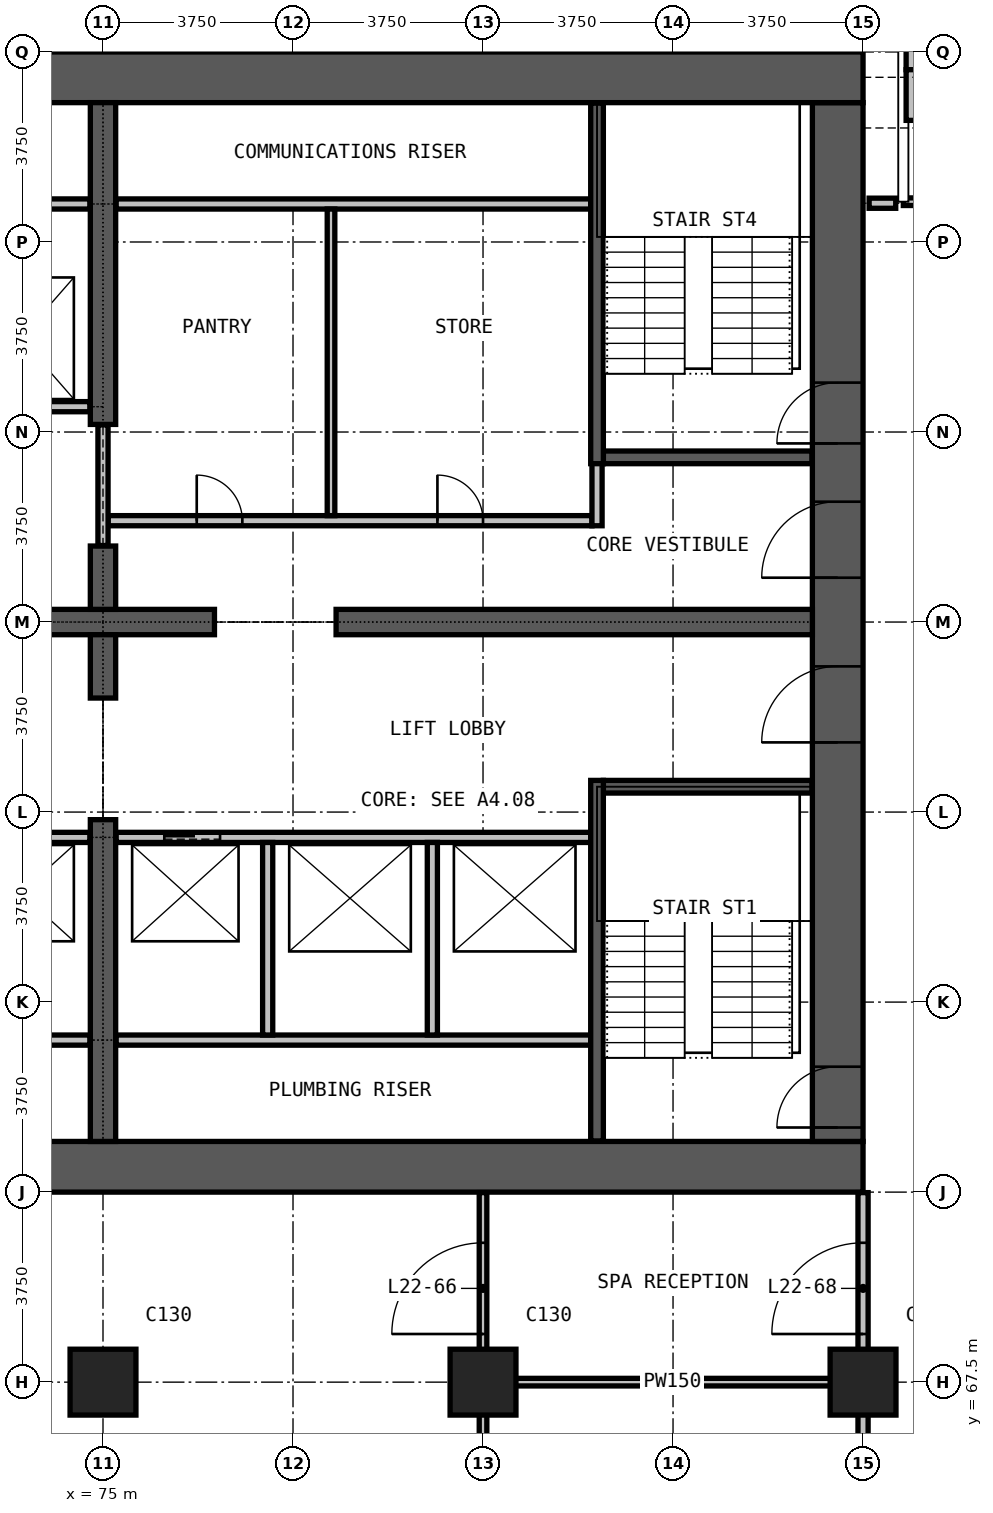
"""IFC4 building model, lengths in metres.
Left out: names, types, materials, properties, quantities, classifications, styles, units other than length and angle.
Written with IfcOpenShell. Run it as: python <this file> out.ifc"""

import sys

from ifc_helpers import new_model, si_unit, direction, frame, frame_2d, origin, origin_2d, place, context, subcontext, project, spatial, rectangle, extrude, element, fill, save


model = new_model("IFC4")
c1 = context("Model", 3, precision=1e-05, world=origin(), true_north=direction((0.0, 1.0)))
c2 = subcontext(c1, "Body", "Model", "MODEL_VIEW")
j1 = project(units=[si_unit("LENGTHUNIT", "METRE"), si_unit("PLANEANGLEUNIT", "RADIAN")], contexts=[c1])
p1 = place(None, origin())
s1 = spatial("IfcSite", under=j1, at=p1, CompositionType="ELEMENT")
p2 = place(p1, origin())
s2 = spatial("IfcBuilding", under=s1, at=p2, CompositionType="ELEMENT")
p3 = place(p2, frame((0.0, 0.0, 92.3)))
s3 = spatial("IfcBuildingStorey", under=s2, at=p3, CompositionType="ELEMENT", Elevation=92.3)
for number, where, z_axis, x_axis in (
    (1, (75.0, 67.5, 0.0), (0.0, 0.0, 1.0), (1.0, 0.0, 0.0)),
    (2, (82.5, 67.5, 0.0), (0.0, 0.0, 1.0), (1.0, 0.0, 0.0)),
    (3, (90.0, 67.5, 0.0), (0.0, 0.0, 1.0), (1.0, 0.0, 0.0)),
):
    element("IfcColumn", number, at=place(p3, frame(where, z_axis=z_axis, x_axis=x_axis)), inside=s3, PredefinedType="COLUMN", context=c2, shape_type="SweptSolid", body=[
        extrude(rectangle(XDim=1.3, YDim=1.3, at=origin_2d()), origin(), (0.0, 0.0, 1.0), 3.3),
    ])
p4 = place(p3, frame((60.0, 71.75, 0.0), z_axis=(0.0, 0.0, 1.0), x_axis=(1.0, 0.0, 0.0)))
e4 = element("IfcWall", 4, at=p4, inside=s3, PredefinedType="SHEAR", context=c2, shape_type="SweptSolid", body=[
    extrude(rectangle(XDim=30.0, YDim=1.0, at=frame_2d((15.0, 0.0))), origin(), (0.0, 0.0, 1.0), 3.3),
])
p5 = place(p3, frame((89.5, 72.25, 0.0), z_axis=(0.0, 0.0, 1.0), x_axis=(0.0, 1.0, 0.0)))
e5 = element("IfcWall", 5, at=p5, inside=s3, PredefinedType="SHEAR", context=c2, shape_type="SweptSolid", body=[
    extrude(rectangle(XDim=20.5, YDim=1.0, at=frame_2d((10.25, 0.0))), origin(), (0.0, 0.0, 1.0), 3.3),
])
p6 = place(p5, frame((0.275, 0.0, 0.0)))
e6 = element("IfcOpeningElement", 6, at=p6, cuts=e5, PredefinedType="OPENING", context=c2, shape_type="SweptSolid", body=[
    extrude(rectangle(XDim=1.2, YDim=2.2, at=frame_2d((0.6, 1.1))), frame((0.0, 0.51, 0.0), z_axis=(0.0, -1.0, 0.0), x_axis=(1.0, 0.0, 0.0)), (0.0, 0.0, 1.0), 1.02),
])
p7 = place(p5, frame((13.775, 0.0, 0.0)))
e7 = element("IfcOpeningElement", 7, at=p7, cuts=e5, PredefinedType="OPENING", context=c2, shape_type="SweptSolid", body=[
    extrude(rectangle(XDim=1.2, YDim=2.2, at=frame_2d((0.6, 1.1))), frame((0.0, 0.51, 0.0), z_axis=(0.0, -1.0, 0.0), x_axis=(1.0, 0.0, 0.0)), (0.0, 0.0, 1.0), 1.02),
])
p8 = place(p5, frame((7.875, 0.0, 0.0)))
e8 = element("IfcOpeningElement", 8, at=p8, cuts=e5, PredefinedType="OPENING", context=c2, shape_type="SweptSolid", body=[
    extrude(rectangle(XDim=1.5, YDim=2.2, at=frame_2d((0.75, 1.1))), frame((0.0, 0.51, 0.0), z_axis=(0.0, -1.0, 0.0), x_axis=(1.0, 0.0, 0.0)), (0.0, 0.0, 1.0), 1.02),
])
p9 = place(p5, frame((11.125, 0.0, 0.0)))
e9 = element("IfcOpeningElement", 9, at=p9, cuts=e5, PredefinedType="OPENING", context=c2, shape_type="SweptSolid", body=[
    extrude(rectangle(XDim=1.5, YDim=2.2, at=frame_2d((0.75, 1.1))), frame((0.0, 0.51, 0.0), z_axis=(0.0, -1.0, 0.0), x_axis=(1.0, 0.0, 0.0)), (0.0, 0.0, 1.0), 1.02),
])
p10 = place(p3, frame((90.0, 93.25, 0.0), z_axis=(0.0, 0.0, 1.0), x_axis=(-1.0, 0.0, 0.0)))
e10 = element("IfcWall", 10, at=p10, inside=s3, PredefinedType="SHEAR", context=c2, shape_type="SweptSolid", body=[
    extrude(rectangle(XDim=30.0, YDim=1.0, at=frame_2d((15.0, 0.0))), origin(), (0.0, 0.0, 1.0), 3.3),
])
p11 = place(p3, frame((72.8, 82.5, 0.0), z_axis=(0.0, 0.0, 1.0), x_axis=(1.0, 0.0, 0.0)))
e11 = element("IfcWall", 11, at=p11, inside=s3, PredefinedType="SHEAR", context=c2, shape_type="SweptSolid", body=[
    extrude(rectangle(XDim=4.4, YDim=0.5, at=frame_2d((2.2, 0.0))), origin(), (0.0, 0.0, 1.0), 3.3),
])
p12 = place(p3, frame((79.6, 82.5, 0.0), z_axis=(0.0, 0.0, 1.0), x_axis=(1.0, 0.0, 0.0)))
e12 = element("IfcWall", 12, at=p12, inside=s3, PredefinedType="SHEAR", context=c2, shape_type="SweptSolid", body=[
    extrude(rectangle(XDim=9.4, YDim=0.5, at=frame_2d((4.7, 0.0))), origin(), (0.0, 0.0, 1.0), 3.3),
])
p13 = place(p3, frame((75.0, 72.25, 0.0), z_axis=(0.0, 0.0, 1.0), x_axis=(0.0, 1.0, 0.0)))
e13 = element("IfcWall", 13, at=p13, inside=s3, PredefinedType="SHEAR", context=c2, shape_type="SweptSolid", body=[
    extrude(rectangle(XDim=6.35, YDim=0.5, at=frame_2d((3.175, 0.0))), origin(), (0.0, 0.0, 1.0), 3.3),
])
for number, where, z_axis, x_axis in (
    (14, (75.0, 81.0, 0.0), (0.0, 0.0, 1.0), (0.0, 1.0, 0.0)),
    (15, (75.0, 82.75, 0.0), (0.0, 0.0, 1.0), (0.0, 1.0, 0.0)),
):
    element("IfcWall", number, at=place(p3, frame(where, z_axis=z_axis, x_axis=x_axis)), inside=s3, PredefinedType="SHEAR", context=c2, shape_type="SweptSolid", body=[
        extrude(rectangle(XDim=1.25, YDim=0.5, at=frame_2d((0.625, 0.0))), origin(), (0.0, 0.0, 1.0), 3.3),
    ])
p14 = place(p3, frame((75.0, 86.4, 0.0), z_axis=(0.0, 0.0, 1.0), x_axis=(0.0, 1.0, 0.0)))
e16 = element("IfcWall", 16, at=p14, inside=s3, PredefinedType="SHEAR", context=c2, shape_type="SweptSolid", body=[
    extrude(rectangle(XDim=6.35, YDim=0.5, at=frame_2d((3.175, 0.0))), origin(), (0.0, 0.0, 1.0), 3.3),
])
p15 = place(p3, frame((90.795, 90.795, 0.0), z_axis=(0.0, 0.0, 1.0), x_axis=(1.0, 0.0, 0.0)))
e17 = element("IfcWall", 17, at=p15, inside=s3, PredefinedType="SOLIDWALL", context=c2, shape_type="SweptSolid", body=[
    extrude(rectangle(XDim=2.955, YDim=0.15, at=frame_2d((1.478, 0.0))), origin(), (0.0, 0.0, 1.0), 3.0),
])
p16 = place(p15, frame((0.877, 0.0, 0.0)))
e18 = element("IfcOpeningElement", 18, at=p16, cuts=e17, PredefinedType="OPENING", context=c2, shape_type="SweptSolid", body=[
    extrude(rectangle(XDim=1.2, YDim=2.4, at=frame_2d((0.6, 1.2))), frame((0.0, 0.085, 0.0), z_axis=(0.0, -1.0, 0.0), x_axis=(1.0, 0.0, 0.0)), (0.0, 0.0, 1.0), 0.17),
])
p17 = place(p3, frame((90.85, 93.625, 0.0), z_axis=(0.0, 0.0, 1.0), x_axis=(1.0, 0.0, 0.0)))
e19 = element("IfcWall", 19, at=p17, inside=s3, PredefinedType="USERDEFINED", context=c2, shape_type="SweptSolid", body=[
    extrude(rectangle(XDim=3.2, YDim=0.45, at=frame_2d((1.6, 0.0))), origin(), (0.0, 0.0, 1.0), 1.1),
])
p18 = place(p3, frame((91.075, 92.4, 0.0), z_axis=(0.0, 0.0, 1.0), x_axis=(0.0, 1.0, 0.0)))
e20 = element("IfcWall", 20, at=p18, inside=s3, PredefinedType="USERDEFINED", context=c2, shape_type="SweptSolid", body=[
    extrude(rectangle(XDim=1.0, YDim=0.45, at=frame_2d((0.5, 0.0))), origin(), (0.0, 0.0, 1.0), 1.1),
])
p19 = place(p3, frame((75.1, 84.5, 0.0), z_axis=(0.0, 0.0, 1.0), x_axis=(1.0, 0.0, 0.0)))
e21 = element("IfcWall", 21, at=p19, inside=s3, PredefinedType="PARTITIONING", context=c2, shape_type="SweptSolid", body=[
    extrude(rectangle(XDim=9.55, YDim=0.2, at=frame_2d((4.775, 0.0))), origin(), (0.0, 0.0, 1.0), 3.0),
])
p20 = place(p19, frame((1.75, 0.0, 0.0)))
e22 = element("IfcOpeningElement", 22, at=p20, cuts=e21, PredefinedType="OPENING", context=c2, shape_type="SweptSolid", body=[
    extrude(rectangle(XDim=0.9, YDim=2.2, at=frame_2d((0.45, 1.1))), frame((0.0, 0.11, 0.0), z_axis=(0.0, -1.0, 0.0), x_axis=(1.0, 0.0, 0.0)), (0.0, 0.0, 1.0), 0.22),
])
p21 = place(p19, frame((6.5, 0.0, 0.0)))
e23 = element("IfcOpeningElement", 23, at=p21, cuts=e21, PredefinedType="OPENING", context=c2, shape_type="SweptSolid", body=[
    extrude(rectangle(XDim=0.9, YDim=2.2, at=frame_2d((0.45, 1.1))), frame((0.0, 0.11, 0.0), z_axis=(0.0, -1.0, 0.0), x_axis=(1.0, 0.0, 0.0)), (0.0, 0.0, 1.0), 0.22),
])
p22 = place(p3, frame((75.26, 90.75, 0.0), z_axis=(0.0, 0.0, 1.0), x_axis=(1.0, 0.0, 0.0)))
e24 = element("IfcWall", 24, at=p22, inside=s3, PredefinedType="PARTITIONING", context=c2, shape_type="SweptSolid", body=[
    extrude(rectangle(XDim=9.365, YDim=0.2, at=frame_2d((4.683, 0.0))), origin(), (0.0, 0.0, 1.0), 3.0),
])
p23 = place(p3, frame((75.0, 84.01, 0.0), z_axis=(0.0, 0.0, 1.0), x_axis=(0.0, 1.0, 0.0)))
e25 = element("IfcWall", 25, at=p23, inside=s3, PredefinedType="PARTITIONING", context=c2, shape_type="SweptSolid", body=[
    extrude(rectangle(XDim=2.38, YDim=0.2, at=frame_2d((1.19, 0.0))), origin(), (0.0, 0.0, 1.0), 2.4),
])
p24 = place(p3, frame((84.75, 84.4, 0.0), z_axis=(0.0, 0.0, 1.0), x_axis=(0.0, 1.0, 0.0)))
e26 = element("IfcWall", 26, at=p24, inside=s3, PredefinedType="PARTITIONING", context=c2, shape_type="SweptSolid", body=[
    extrude(rectangle(XDim=1.475, YDim=0.2, at=frame_2d((0.738, 0.0))), origin(), (0.0, 0.0, 1.0), 3.0),
])
p25 = place(p3, frame((90.12, 90.765, 0.0), z_axis=(0.0, 0.0, 1.0), x_axis=(1.0, 0.0, 0.0)))
e27 = element("IfcWall", 27, at=p25, inside=s3, PredefinedType="PARTITIONING", context=c2, shape_type="SweptSolid", body=[
    extrude(rectangle(XDim=0.525, YDim=0.2, at=frame_2d((0.262, 0.0))), origin(), (0.0, 0.0, 1.0), 3.0),
])
p26 = place(p3, frame((90.0, 52.4, 0.0), z_axis=(0.0, 0.0, 1.0), x_axis=(0.0, 1.0, 0.0)))
e28 = element("IfcWall", 28, at=p26, inside=s3, PredefinedType="PARTITIONING", context=c2, shape_type="SweptSolid", body=[
    extrude(rectangle(XDim=18.84, YDim=0.2, at=frame_2d((9.42, 0.0))), origin(), (0.0, 0.0, 1.0), 3.0),
])
p27 = place(p26, frame((3.35, 0.0, 0.0)))
e29 = element("IfcOpeningElement", 29, at=p27, cuts=e28, PredefinedType="OPENING", context=c2, shape_type="SweptSolid", body=[
    extrude(rectangle(XDim=1.0, YDim=2.2, at=frame_2d((0.5, 1.1))), frame((0.0, 0.11, 0.0), z_axis=(0.0, -1.0, 0.0), x_axis=(1.0, 0.0, 0.0)), (0.0, 0.0, 1.0), 0.22),
])
p28 = place(p26, frame((10.85, 0.0, 0.0)))
e30 = element("IfcOpeningElement", 30, at=p28, cuts=e28, PredefinedType="OPENING", context=c2, shape_type="SweptSolid", body=[
    extrude(rectangle(XDim=1.0, YDim=2.2, at=frame_2d((0.5, 1.1))), frame((0.0, 0.11, 0.0), z_axis=(0.0, -1.0, 0.0), x_axis=(1.0, 0.0, 0.0)), (0.0, 0.0, 1.0), 0.22),
])
p29 = place(p26, frame((16.05, 0.0, 0.0)))
e31 = element("IfcOpeningElement", 31, at=p29, cuts=e28, PredefinedType="OPENING", context=c2, shape_type="SweptSolid", body=[
    extrude(rectangle(XDim=1.8, YDim=2.2, at=frame_2d((0.9, 1.1))), frame((0.0, 0.11, 0.0), z_axis=(0.0, -1.0, 0.0), x_axis=(1.0, 0.0, 0.0)), (0.0, 0.0, 1.0), 0.22),
])
p30 = place(p3, frame((82.575, 67.5, 0.0), z_axis=(0.0, 0.0, 1.0), x_axis=(1.0, 0.0, 0.0)))
e32 = element("IfcWall", 32, at=p30, inside=s3, PredefinedType="PARTITIONING", context=c2, shape_type="SweptSolid", body=[
    extrude(rectangle(XDim=7.325, YDim=0.15, at=frame_2d((3.663, 0.0))), origin(), (0.0, 0.0, 1.0), 3.0),
])
p31 = place(p3, frame((79.5, 84.6, 0.0), z_axis=(0.0, 0.0, 1.0), x_axis=(0.0, 1.0, 0.0)))
e33 = element("IfcWall", 33, at=p31, inside=s3, PredefinedType="PARTITIONING", context=c2, shape_type="SweptSolid", body=[
    extrude(rectangle(XDim=6.05, YDim=0.15, at=frame_2d((3.025, 0.0))), origin(), (0.0, 0.0, 1.0), 3.0),
])
p32 = place(p3, frame((82.5, 60.075, 0.0), z_axis=(0.0, 0.0, 1.0), x_axis=(0.0, 1.0, 0.0)))
e34 = element("IfcWall", 34, at=p32, inside=s3, PredefinedType="PARTITIONING", context=c2, shape_type="SweptSolid", body=[
    extrude(rectangle(XDim=11.165, YDim=0.15, at=frame_2d((5.583, 0.0))), origin(), (0.0, 0.0, 1.0), 3.0),
])
p33 = place(p32, frame((8.375, 0.0, 0.0)))
e35 = element("IfcOpeningElement", 35, at=p33, cuts=e34, PredefinedType="OPENING", context=c2, shape_type="SweptSolid", body=[
    extrude(rectangle(XDim=1.8, YDim=2.2, at=frame_2d((0.9, 1.1))), frame((0.0, 0.085, 0.0), z_axis=(0.0, -1.0, 0.0), x_axis=(1.0, 0.0, 0.0)), (0.0, 0.0, 1.0), 0.17),
])
for number, where, z_axis, x_axis in (
    (36, (65.375, 74.25, 0.0), (0.0, 0.0, 1.0), (1.0, 0.0, 0.0)),
    (37, (75.26, 74.25, 0.0), (0.0, 0.0, 1.0), (1.0, 0.0, 0.0)),
):
    element("IfcWall", number, at=place(p3, frame(where, z_axis=z_axis, x_axis=x_axis)), inside=s3, PredefinedType="PARTITIONING", context=c2, shape_type="SweptSolid", body=[
        extrude(rectangle(XDim=9.365, YDim=0.2, at=frame_2d((4.683, 0.0))), origin(), (0.0, 0.0, 1.0), 3.0),
    ])
p34 = place(p3, frame((65.375, 78.25, 0.0), z_axis=(0.0, 0.0, 1.0), x_axis=(1.0, 0.0, 0.0)))
e38 = element("IfcWall", 38, at=p34, inside=s3, PredefinedType="PARTITIONING", context=c2, shape_type="SweptSolid", body=[
    extrude(rectangle(XDim=9.365, YDim=0.2, at=frame_2d((4.683, 0.0))), origin(), (0.0, 0.0, 1.0), 3.0),
])
p35 = place(p34, frame((1.0, 0.0, 0.0)))
e39 = element("IfcOpeningElement", 39, at=p35, cuts=e38, PredefinedType="OPENING", context=c2, shape_type="SweptSolid", body=[
    extrude(rectangle(XDim=1.1, YDim=2.2, at=frame_2d((0.55, 1.1))), frame((0.0, 0.11, 0.0), z_axis=(0.0, -1.0, 0.0), x_axis=(1.0, 0.0, 0.0)), (0.0, 0.0, 1.0), 0.22),
])
p36 = place(p34, frame((4.175, 0.0, 0.0)))
e40 = element("IfcOpeningElement", 40, at=p36, cuts=e38, PredefinedType="OPENING", context=c2, shape_type="SweptSolid", body=[
    extrude(rectangle(XDim=1.1, YDim=2.2, at=frame_2d((0.55, 1.1))), frame((0.0, 0.11, 0.0), z_axis=(0.0, -1.0, 0.0), x_axis=(1.0, 0.0, 0.0)), (0.0, 0.0, 1.0), 0.22),
])
p37 = place(p34, frame((7.325, 0.0, 0.0)))
e41 = element("IfcOpeningElement", 41, at=p37, cuts=e38, PredefinedType="OPENING", context=c2, shape_type="SweptSolid", body=[
    extrude(rectangle(XDim=1.1, YDim=2.2, at=frame_2d((0.55, 1.1))), frame((0.0, 0.11, 0.0), z_axis=(0.0, -1.0, 0.0), x_axis=(1.0, 0.0, 0.0)), (0.0, 0.0, 1.0), 0.22),
])
p38 = place(p3, frame((75.26, 78.25, 0.0), z_axis=(0.0, 0.0, 1.0), x_axis=(1.0, 0.0, 0.0)))
e42 = element("IfcWall", 42, at=p38, inside=s3, PredefinedType="PARTITIONING", context=c2, shape_type="SweptSolid", body=[
    extrude(rectangle(XDim=9.365, YDim=0.2, at=frame_2d((4.683, 0.0))), origin(), (0.0, 0.0, 1.0), 3.0),
])
p39 = place(p38, frame((0.95, 0.0, 0.0)))
e43 = element("IfcOpeningElement", 43, at=p39, cuts=e42, PredefinedType="OPENING", context=c2, shape_type="SweptSolid", body=[
    extrude(rectangle(XDim=1.1, YDim=2.2, at=frame_2d((0.55, 1.1))), frame((0.0, 0.11, 0.0), z_axis=(0.0, -1.0, 0.0), x_axis=(1.0, 0.0, 0.0)), (0.0, 0.0, 1.0), 0.22),
])
p40 = place(p3, frame((65.375, 86.75, 0.0), z_axis=(0.0, 0.0, 1.0), x_axis=(1.0, 0.0, 0.0)))
e44 = element("IfcWall", 44, at=p40, inside=s3, PredefinedType="PARTITIONING", context=c2, shape_type="SweptSolid", body=[
    extrude(rectangle(XDim=9.365, YDim=0.2, at=frame_2d((4.683, 0.0))), origin(), (0.0, 0.0, 1.0), 3.0),
])
p41 = place(p40, frame((1.0, 0.0, 0.0)))
e45 = element("IfcOpeningElement", 45, at=p41, cuts=e44, PredefinedType="OPENING", context=c2, shape_type="SweptSolid", body=[
    extrude(rectangle(XDim=1.1, YDim=2.2, at=frame_2d((0.55, 1.1))), frame((0.0, 0.11, 0.0), z_axis=(0.0, -1.0, 0.0), x_axis=(1.0, 0.0, 0.0)), (0.0, 0.0, 1.0), 0.22),
])
p42 = place(p40, frame((4.175, 0.0, 0.0)))
e46 = element("IfcOpeningElement", 46, at=p42, cuts=e44, PredefinedType="OPENING", context=c2, shape_type="SweptSolid", body=[
    extrude(rectangle(XDim=1.1, YDim=2.2, at=frame_2d((0.55, 1.1))), frame((0.0, 0.11, 0.0), z_axis=(0.0, -1.0, 0.0), x_axis=(1.0, 0.0, 0.0)), (0.0, 0.0, 1.0), 0.22),
])
p43 = place(p40, frame((7.325, 0.0, 0.0)))
e47 = element("IfcOpeningElement", 47, at=p43, cuts=e44, PredefinedType="OPENING", context=c2, shape_type="SweptSolid", body=[
    extrude(rectangle(XDim=1.1, YDim=2.2, at=frame_2d((0.55, 1.1))), frame((0.0, 0.11, 0.0), z_axis=(0.0, -1.0, 0.0), x_axis=(1.0, 0.0, 0.0)), (0.0, 0.0, 1.0), 0.22),
])
p44 = place(p3, frame((65.375, 90.75, 0.0), z_axis=(0.0, 0.0, 1.0), x_axis=(1.0, 0.0, 0.0)))
e48 = element("IfcWall", 48, at=p44, inside=s3, PredefinedType="PARTITIONING", context=c2, shape_type="SweptSolid", body=[
    extrude(rectangle(XDim=9.365, YDim=0.2, at=frame_2d((4.683, 0.0))), origin(), (0.0, 0.0, 1.0), 3.0),
])
for number, where, z_axis, x_axis in (
    (49, (78.25, 74.35, 0.0), (0.0, 0.0, 1.0), (0.0, 1.0, 0.0)),
    (50, (81.5, 74.35, 0.0), (0.0, 0.0, 1.0), (0.0, 1.0, 0.0)),
):
    element("IfcWall", number, at=place(p3, frame(where, z_axis=z_axis, x_axis=x_axis)), inside=s3, PredefinedType="PARTITIONING", context=c2, shape_type="SweptSolid", body=[
        extrude(rectangle(XDim=3.8, YDim=0.2, at=frame_2d((1.9, 0.0))), origin(), (0.0, 0.0, 1.0), 3.0),
    ])
for number, where, z_axis, x_axis in (
    (51, (84.875, 79.25, 0.0), (0.0, 0.0, 1.0), (1.0, 0.0, 0.0)),
    (52, (84.875, 85.75, 0.0), (0.0, 0.0, 1.0), (1.0, 0.0, 0.0)),
):
    element("IfcWall", number, at=place(p3, frame(where, z_axis=z_axis, x_axis=x_axis)), inside=s3, PredefinedType="PARTITIONING", context=c2, shape_type="SweptSolid", body=[
        extrude(rectangle(XDim=4.115, YDim=0.25, at=frame_2d((2.058, 0.0))), origin(), (0.0, 0.0, 1.0), 3.0),
    ])
for number, where, z_axis, x_axis in (
    (53, (84.75, 72.26, 0.0), (0.0, 0.0, 1.0), (0.0, 1.0, 0.0)),
    (54, (84.75, 85.625, 0.0), (0.0, 0.0, 1.0), (0.0, 1.0, 0.0)),
):
    element("IfcWall", number, at=place(p3, frame(where, z_axis=z_axis, x_axis=x_axis)), inside=s3, PredefinedType="PARTITIONING", context=c2, shape_type="SweptSolid", body=[
        extrude(rectangle(XDim=7.115, YDim=0.25, at=frame_2d((3.558, 0.0))), origin(), (0.0, 0.0, 1.0), 3.0),
    ])
p45 = place(p39, origin())
e55 = element("IfcDoor", 55, at=p45, inside=s3, OperationType="DOUBLE_DOOR_SLIDING", PredefinedType="DOOR", context=c2, shape_type="SweptSolid", body=[
    extrude(rectangle(XDim=1.1, YDim=2.2, at=frame_2d((0.55, 1.1))), frame((0.0, 0.025, 0.0), z_axis=(0.0, -1.0, 0.0), x_axis=(1.0, 0.0, 0.0)), (0.0, 0.0, 1.0), 0.05),
])
fill(e43, e55)
p46 = place(p6, origin())
e56 = element("IfcDoor", 56, at=p46, inside=s3, OperationType="SINGLE_SWING_LEFT", PredefinedType="DOOR", context=c2, shape_type="SweptSolid", body=[
    extrude(rectangle(XDim=1.2, YDim=2.2, at=frame_2d((0.6, 1.1))), frame((0.0, 0.025, 0.0), z_axis=(0.0, -1.0, 0.0), x_axis=(1.0, 0.0, 0.0)), (0.0, 0.0, 1.0), 0.05),
])
fill(e6, e56)
p47 = place(p7, origin())
e57 = element("IfcDoor", 57, at=p47, inside=s3, OperationType="SINGLE_SWING_LEFT", PredefinedType="DOOR", context=c2, shape_type="SweptSolid", body=[
    extrude(rectangle(XDim=1.2, YDim=2.2, at=frame_2d((0.6, 1.1))), frame((0.0, 0.025, 0.0), z_axis=(0.0, -1.0, 0.0), x_axis=(1.0, 0.0, 0.0)), (0.0, 0.0, 1.0), 0.05),
])
fill(e7, e57)
p48 = place(p8, origin())
e58 = element("IfcDoor", 58, at=p48, inside=s3, OperationType="DOUBLE_DOOR_SINGLE_SWING", PredefinedType="DOOR", context=c2, shape_type="SweptSolid", body=[
    extrude(rectangle(XDim=1.5, YDim=2.2, at=frame_2d((0.75, 1.1))), frame((0.0, 0.025, 0.0), z_axis=(0.0, -1.0, 0.0), x_axis=(1.0, 0.0, 0.0)), (0.0, 0.0, 1.0), 0.05),
])
fill(e8, e58)
p49 = place(p9, origin())
e59 = element("IfcDoor", 59, at=p49, inside=s3, OperationType="DOUBLE_DOOR_SINGLE_SWING", PredefinedType="DOOR", context=c2, shape_type="SweptSolid", body=[
    extrude(rectangle(XDim=1.5, YDim=2.2, at=frame_2d((0.75, 1.1))), frame((0.0, 0.025, 0.0), z_axis=(0.0, -1.0, 0.0), x_axis=(1.0, 0.0, 0.0)), (0.0, 0.0, 1.0), 0.05),
])
fill(e9, e59)
p50 = place(p20, origin())
e60 = element("IfcDoor", 60, at=p50, inside=s3, OperationType="SINGLE_SWING_LEFT", PredefinedType="DOOR", context=c2, shape_type="SweptSolid", body=[
    extrude(rectangle(XDim=0.9, YDim=2.2, at=frame_2d((0.45, 1.1))), frame((0.0, 0.025, 0.0), z_axis=(0.0, -1.0, 0.0), x_axis=(1.0, 0.0, 0.0)), (0.0, 0.0, 1.0), 0.05),
])
fill(e22, e60)
p51 = place(p21, origin())
e61 = element("IfcDoor", 61, at=p51, inside=s3, OperationType="SINGLE_SWING_LEFT", PredefinedType="DOOR", context=c2, shape_type="SweptSolid", body=[
    extrude(rectangle(XDim=0.9, YDim=2.2, at=frame_2d((0.45, 1.1))), frame((0.0, 0.025, 0.0), z_axis=(0.0, -1.0, 0.0), x_axis=(1.0, 0.0, 0.0)), (0.0, 0.0, 1.0), 0.05),
])
fill(e23, e61)
p52 = place(p33, origin())
e62 = element("IfcDoor", 62, at=p52, inside=s3, OperationType="DOUBLE_DOOR_SINGLE_SWING", PredefinedType="DOOR", context=c2, shape_type="SweptSolid", body=[
    extrude(rectangle(XDim=1.8, YDim=2.2, at=frame_2d((0.9, 1.1))), frame((0.0, 0.025, 0.0), z_axis=(0.0, -1.0, 0.0), x_axis=(1.0, 0.0, 0.0)), (0.0, 0.0, 1.0), 0.05),
])
fill(e35, e62)
p53 = place(p29, origin())
e63 = element("IfcDoor", 63, at=p53, inside=s3, OperationType="DOUBLE_DOOR_SINGLE_SWING", PredefinedType="DOOR", context=c2, shape_type="SweptSolid", body=[
    extrude(rectangle(XDim=1.8, YDim=2.2, at=frame_2d((0.9, 1.1))), frame((0.0, 0.025, 0.0), z_axis=(0.0, -1.0, 0.0), x_axis=(1.0, 0.0, 0.0)), (0.0, 0.0, 1.0), 0.05),
])
fill(e31, e63)
save(model, sys.argv[1])
